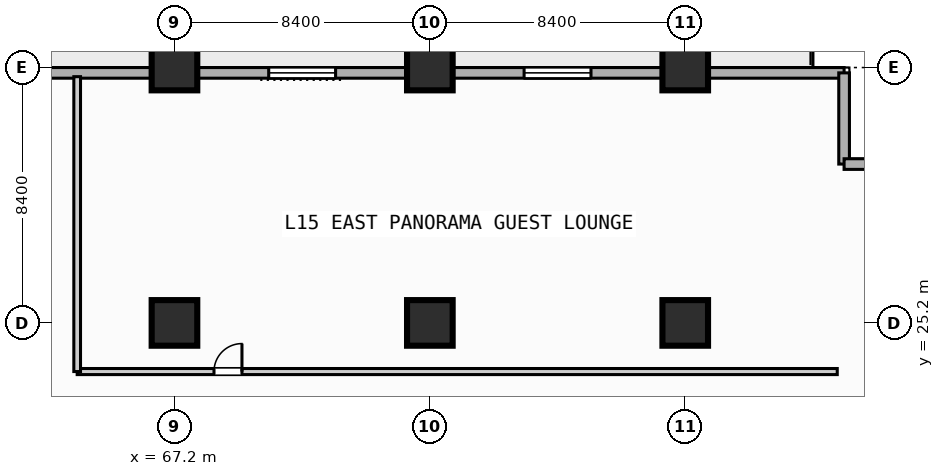
"""IFC4 building model, lengths in metres.
Left out: names, types, materials, properties, quantities, classifications, styles, units other than length and angle.
Written with IfcOpenShell. Run it as: python <this file> out.ifc"""

import sys

from ifc_helpers import new_model, si_unit, direction, frame, frame_2d, origin, origin_2d, place, context, subcontext, project, spatial, rectangle, extrude, element, fill, save


model = new_model("IFC4")
c1 = context("Model", 3, precision=1e-05, world=origin(), true_north=direction((0.0, 1.0)))
c2 = subcontext(c1, "Body", "Model", "MODEL_VIEW")
j1 = project(units=[si_unit("LENGTHUNIT", "METRE"), si_unit("PLANEANGLEUNIT", "RADIAN")], contexts=[c1])
p1 = place(None, origin())
s1 = spatial("IfcSite", under=j1, at=p1, CompositionType="ELEMENT")
p2 = place(p1, origin())
s2 = spatial("IfcBuilding", under=s1, at=p2, CompositionType="ELEMENT")
p3 = place(p2, frame((0.0, 0.0, 66.2)))
s3 = spatial("IfcBuildingStorey", under=s2, at=p3, CompositionType="ELEMENT", Elevation=66.2)
for number, where, z_axis, x_axis in (
    (1, (67.2, 25.2, 0.0), (0.0, 0.0, 1.0), (1.0, 0.0, 0.0)),
    (2, (67.2, 33.6, 0.0), (0.0, 0.0, 1.0), (1.0, 0.0, 0.0)),
    (3, (75.6, 25.2, 0.0), (0.0, 0.0, 1.0), (1.0, 0.0, 0.0)),
    (4, (75.6, 33.6, 0.0), (0.0, 0.0, 1.0), (1.0, 0.0, 0.0)),
    (5, (84.0, 25.2, 0.0), (0.0, 0.0, 1.0), (1.0, 0.0, 0.0)),
    (6, (84.0, 33.6, 0.0), (0.0, 0.0, 1.0), (1.0, 0.0, 0.0)),
):
    element("IfcColumn", number, at=place(p3, frame(where, z_axis=z_axis, x_axis=x_axis)), inside=s3, PredefinedType="COLUMN", context=c2, shape_type="SweptSolid", body=[
        extrude(rectangle(XDim=1.5, YDim=1.5, at=origin_2d()), origin(), (0.0, 0.0, 1.0), 3.8),
    ])
p4 = place(p3, frame((33.425, 33.425, 0.0), z_axis=(0.0, 0.0, 1.0), x_axis=(1.0, 0.0, 0.0)))
e7 = element("IfcWall", 7, at=p4, inside=s3, PredefinedType="STANDARD", context=c2, shape_type="SweptSolid", body=[
    extrude(rectangle(XDim=55.8, YDim=0.35, at=frame_2d((27.9, 0.0))), origin(), (0.0, 0.0, 1.0), 3.55),
])
p5 = place(p4, frame((12.075, 0.0, 0.0)))
e8 = element("IfcOpeningElement", 8, at=p5, cuts=e7, PredefinedType="OPENING", context=c2, shape_type="SweptSolid", body=[
    extrude(rectangle(XDim=1.4, YDim=2.2, at=frame_2d((0.7, 1.1))), frame((0.0, 0.185, 0.0), z_axis=(0.0, -1.0, 0.0), x_axis=(1.0, 0.0, 0.0)), (0.0, 0.0, 1.0), 0.37),
])
p6 = place(p4, frame((3.275, 0.0, 0.85)))
e9 = element("IfcOpeningElement", 9, at=p6, cuts=e7, PredefinedType="OPENING", context=c2, shape_type="SweptSolid", body=[
    extrude(rectangle(XDim=2.2, YDim=1.8, at=frame_2d((1.1, 0.9))), frame((0.0, 0.185, 0.0), z_axis=(0.0, -1.0, 0.0), x_axis=(1.0, 0.0, 0.0)), (0.0, 0.0, 1.0), 0.37),
])
p7 = place(p4, frame((36.875, 0.0, 0.85)))
e10 = element("IfcOpeningElement", 10, at=p7, cuts=e7, PredefinedType="OPENING", context=c2, shape_type="SweptSolid", body=[
    extrude(rectangle(XDim=2.2, YDim=1.8, at=frame_2d((1.1, 0.9))), frame((0.0, 0.185, 0.0), z_axis=(0.0, -1.0, 0.0), x_axis=(1.0, 0.0, 0.0)), (0.0, 0.0, 1.0), 0.37),
])
p8 = place(p4, frame((45.275, 0.0, 0.85)))
e11 = element("IfcOpeningElement", 11, at=p8, cuts=e7, PredefinedType="OPENING", context=c2, shape_type="SweptSolid", body=[
    extrude(rectangle(XDim=2.2, YDim=1.8, at=frame_2d((1.1, 0.9))), frame((0.0, 0.185, 0.0), z_axis=(0.0, -1.0, 0.0), x_axis=(1.0, 0.0, 0.0)), (0.0, 0.0, 1.0), 0.37),
])
for number, where, z_axis, x_axis in (
    (12, (89.225, 33.425, 0.0), (0.0, 0.0, 1.0), (0.0, -1.0, 0.0)),
    (13, (89.225, 30.425, 0.0), (0.0, 0.0, 1.0), (1.0, 0.0, 0.0)),
):
    element("IfcWall", number, at=place(p3, frame(where, z_axis=z_axis, x_axis=x_axis)), inside=s3, PredefinedType="STANDARD", context=c2, shape_type="SweptSolid", body=[
        extrude(rectangle(XDim=3.0, YDim=0.35, at=frame_2d((1.5, 0.0))), origin(), (0.0, 0.0, 1.0), 3.55),
    ])
p9 = place(p3, frame((64.0, 23.6, 0.0), z_axis=(0.0, 0.0, 1.0), x_axis=(1.0, 0.0, 0.0)))
e14 = element("IfcWall", 14, at=p9, inside=s3, PredefinedType="PARTITIONING", context=c2, shape_type="SweptSolid", body=[
    extrude(rectangle(XDim=25.0, YDim=0.2, at=frame_2d((12.5, 0.0))), origin(), (0.0, 0.0, 1.0), 3.55),
])
p10 = place(p9, frame((4.5, 0.0, 0.0)))
e15 = element("IfcOpeningElement", 15, at=p10, cuts=e14, PredefinedType="OPENING", context=c2, shape_type="SweptSolid", body=[
    extrude(rectangle(XDim=0.92, YDim=2.1, at=frame_2d((0.46, 1.05))), frame((0.0, 0.11, 0.0), z_axis=(0.0, -1.0, 0.0), x_axis=(1.0, 0.0, 0.0)), (0.0, 0.0, 1.0), 0.22),
])
p11 = place(p3, frame((64.0, 23.6, 0.0), z_axis=(0.0, 0.0, 1.0), x_axis=(0.0, 1.0, 0.0)))
e16 = element("IfcWall", 16, at=p11, inside=s3, PredefinedType="PARTITIONING", context=c2, shape_type="SweptSolid", body=[
    extrude(rectangle(XDim=9.7, YDim=0.22, at=frame_2d((4.85, 0.0))), origin(), (0.0, 0.0, 1.0), 3.55),
])
p12 = place(p7, origin())
e17 = element("IfcWindow", 17, at=p12, inside=s3, PartitioningType="SINGLE_PANEL", PredefinedType="WINDOW", context=c2, shape_type="SweptSolid", body=[
    extrude(rectangle(XDim=2.2, YDim=1.8, at=frame_2d((1.1, 0.9))), frame((0.0, 0.03, 0.0), z_axis=(0.0, -1.0, 0.0), x_axis=(1.0, 0.0, 0.0)), (0.0, 0.0, 1.0), 0.06),
])
fill(e10, e17)
p13 = place(p8, origin())
e18 = element("IfcWindow", 18, at=p13, inside=s3, PartitioningType="SINGLE_PANEL", PredefinedType="WINDOW", context=c2, shape_type="SweptSolid", body=[
    extrude(rectangle(XDim=2.2, YDim=1.8, at=frame_2d((1.1, 0.9))), frame((0.0, 0.03, 0.0), z_axis=(0.0, -1.0, 0.0), x_axis=(1.0, 0.0, 0.0)), (0.0, 0.0, 1.0), 0.06),
])
fill(e11, e18)
p14 = place(p10, origin())
e19 = element("IfcDoor", 19, at=p14, inside=s3, OperationType="SINGLE_SWING_RIGHT", PredefinedType="DOOR", context=c2, shape_type="SweptSolid", body=[
    extrude(rectangle(XDim=0.92, YDim=2.1, at=frame_2d((0.46, 1.05))), frame((0.0, 0.025, 0.0), z_axis=(0.0, -1.0, 0.0), x_axis=(1.0, 0.0, 0.0)), (0.0, 0.0, 1.0), 0.05),
])
fill(e15, e19)
save(model, sys.argv[1])
